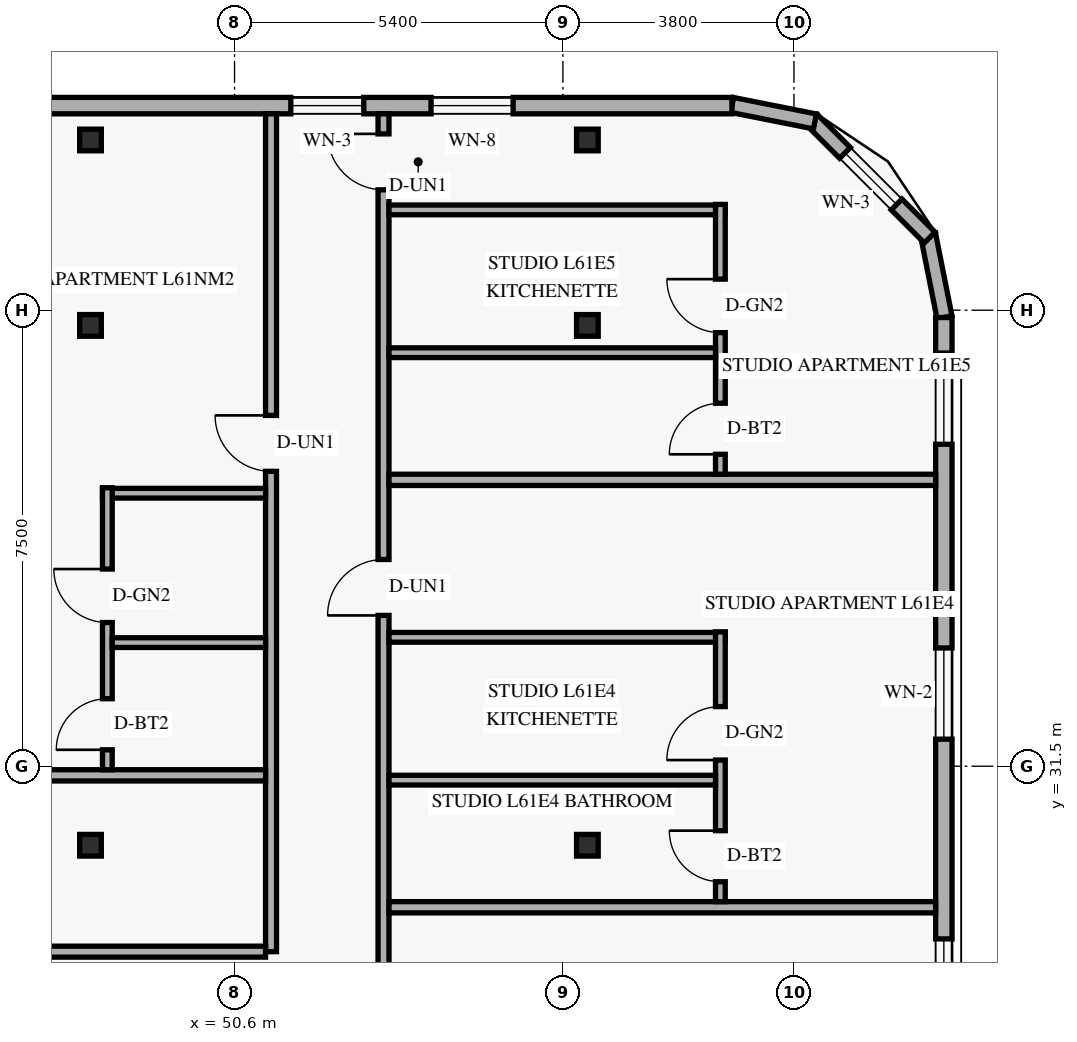
"""IFC4 building model, lengths in metres.
Left out: names, types, materials, properties, quantities, classifications, styles, units other than length and angle.
Written with IfcOpenShell. Run it as: python <this file> out.ifc"""

import sys

from ifc_helpers import new_model, si_unit, direction, frame, frame_2d, origin, origin_2d, place, context, subcontext, project, spatial, rectangle, hollow_rectangle, extrude, element, fill, save


model = new_model("IFC4")
c1 = context("Model", 3, precision=1e-05, world=origin(), true_north=direction((0.0, 1.0)))
c2 = subcontext(c1, "Body", "Model", "MODEL_VIEW")
j1 = project(units=[si_unit("LENGTHUNIT", "METRE"), si_unit("PLANEANGLEUNIT", "RADIAN")], contexts=[c1])
p1 = place(None, origin())
s1 = spatial("IfcSite", under=j1, at=p1, CompositionType="ELEMENT")
p2 = place(p1, origin())
s2 = spatial("IfcBuilding", under=s1, at=p2, CompositionType="ELEMENT")
p3 = place(p2, frame((0.0, 0.0, 235.2)))
s3 = spatial("IfcBuildingStorey", under=s2, at=p3, CompositionType="ELEMENT", Elevation=235.2)
for number, where, z_axis, x_axis in (
    (1, (48.168, 30.2, 0.0), (0.035, 0.0, 0.999), (0.0, 1.0, 0.0)),
    (2, (48.168, 38.75, 0.0), (0.035, 0.0, 0.999), (0.0, 1.0, 0.0)),
    (3, (48.168, 41.8, 0.0), (0.035, 0.0, 0.999), (0.0, 1.0, 0.0)),
):
    element("IfcColumn", number, at=place(p3, frame(where, z_axis=z_axis, x_axis=x_axis)), inside=s3, PredefinedType="COLUMN", context=c2, shape_type="SweptSolid", body=[
        extrude(hollow_rectangle(XDim=0.356, YDim=0.356, WallThickness=0.016, at=origin_2d()), origin(), (0.0, 0.0, 1.0), 3.602),
    ])
for number, where, z_axis, x_axis in (
    (4, (56.298, 30.2, 0.0), (0.058, 0.0, 0.998), (0.0, 1.0, 0.0)),
    (5, (56.298, 38.75, 0.0), (0.058, 0.0, 0.998), (0.0, 1.0, 0.0)),
    (6, (56.298, 41.8, 0.0), (0.058, 0.0, 0.998), (0.0, 1.0, 0.0)),
):
    element("IfcColumn", number, at=place(p3, frame(where, z_axis=z_axis, x_axis=x_axis)), inside=s3, PredefinedType="COLUMN", context=c2, shape_type="SweptSolid", body=[
        extrude(hollow_rectangle(XDim=0.356, YDim=0.356, WallThickness=0.016, at=origin_2d()), origin(), (0.0, 0.0, 1.0), 3.606),
    ])
p4 = place(p3, frame((62.276, 38.884, 0.0), z_axis=(0.0, 0.0, 1.0), x_axis=(-0.195135625965, 0.9807762678, 0.0)))
e7 = element("IfcWall", 7, at=p4, inside=s3, PredefinedType="SOLIDWALL", context=c2, shape_type="SweptSolid", body=[
    extrude(rectangle(XDim=1.389, YDim=0.25, at=frame_2d((0.694, 0.0))), origin(), (0.0, 0.0, 1.0), 3.36),
])
p5 = place(p3, frame((62.032, 40.195, 0.0), z_axis=(0.0, 0.0, 1.0), x_axis=(-0.707106781187, 0.707106781187, 0.0)))
e8 = element("IfcWall", 8, at=p5, inside=s3, PredefinedType="SOLIDWALL", context=c2, shape_type="SweptSolid", body=[
    extrude(rectangle(XDim=2.739, YDim=0.25, at=frame_2d((1.37, 0.0))), origin(), (0.0, 0.0, 1.0), 3.36),
])
p6 = place(p5, frame((0.77, 0.0, 0.85)))
e9 = element("IfcOpeningElement", 9, at=p6, cuts=e8, PredefinedType="OPENING", context=c2, shape_type="SweptSolid", body=[
    extrude(rectangle(XDim=1.2, YDim=1.5, at=frame_2d((0.6, 0.75))), frame((0.0, 0.135, 0.0), z_axis=(0.0, -1.0, 0.0), x_axis=(1.0, 0.0, 0.0)), (0.0, 0.0, 1.0), 0.27),
])
p7 = place(p3, frame((60.146, 42.105, 0.0), z_axis=(0.0, 0.0, 1.0), x_axis=(-0.980809899341, 0.19496651342, 0.0)))
e10 = element("IfcWall", 10, at=p7, inside=s3, PredefinedType="SOLIDWALL", context=c2, shape_type="SweptSolid", body=[
    extrude(rectangle(XDim=1.389, YDim=0.25, at=frame_2d((0.694, 0.0))), origin(), (0.0, 0.0, 1.0), 3.36),
])
p8 = place(p3, frame((62.265, 26.64, 0.0), z_axis=(0.0, 0.0, 1.0), x_axis=(0.0, 1.0, 0.0)))
e11 = element("IfcWall", 11, at=p8, inside=s3, PredefinedType="SOLIDWALL", context=c2, shape_type="SweptSolid", body=[
    extrude(rectangle(XDim=12.24, YDim=0.27, at=frame_2d((6.12, 0.0))), origin(), (0.0, 0.0, 1.0), 3.36),
])
p9 = place(p8, frame((0.52, 0.0, 0.85)))
e12 = element("IfcOpeningElement", 12, at=p9, cuts=e11, PredefinedType="OPENING", context=c2, shape_type="SweptSolid", body=[
    extrude(rectangle(XDim=1.5, YDim=1.55, at=frame_2d((0.75, 0.775))), frame((0.0, 0.145, 0.0), z_axis=(0.0, -1.0, 0.0), x_axis=(1.0, 0.0, 0.0)), (0.0, 0.0, 1.0), 0.29),
])
p10 = place(p8, frame((5.305, 0.0, 0.85)))
e13 = element("IfcOpeningElement", 13, at=p10, cuts=e11, PredefinedType="OPENING", context=c2, shape_type="SweptSolid", body=[
    extrude(rectangle(XDim=1.5, YDim=1.55, at=frame_2d((0.75, 0.775))), frame((0.0, 0.145, 0.0), z_axis=(0.0, -1.0, 0.0), x_axis=(1.0, 0.0, 0.0)), (0.0, 0.0, 1.0), 0.29),
])
p11 = place(p8, frame((10.155, 0.0, 0.85)))
e14 = element("IfcOpeningElement", 14, at=p11, cuts=e11, PredefinedType="OPENING", context=c2, shape_type="SweptSolid", body=[
    extrude(rectangle(XDim=1.5, YDim=1.55, at=frame_2d((0.75, 0.775))), frame((0.0, 0.145, 0.0), z_axis=(0.0, -1.0, 0.0), x_axis=(1.0, 0.0, 0.0)), (0.0, 0.0, 1.0), 0.29),
])
p12 = place(p3, frame((58.78, 42.365, 0.0), z_axis=(0.0, 0.0, 1.0), x_axis=(-1.0, 0.0, 0.0)))
e15 = element("IfcWall", 15, at=p12, inside=s3, PredefinedType="SOLIDWALL", context=c2, shape_type="SweptSolid", body=[
    extrude(rectangle(XDim=32.96, YDim=0.27, at=frame_2d((16.48, 0.0))), origin(), (0.0, 0.0, 1.0), 3.36),
])
p13 = place(p12, frame((17.96, 0.0, 0.85)))
e16 = element("IfcOpeningElement", 16, at=p13, cuts=e15, PredefinedType="OPENING", context=c2, shape_type="SweptSolid", body=[
    extrude(rectangle(XDim=1.35, YDim=1.55, at=frame_2d((0.675, 0.775))), frame((0.0, 0.145, 0.0), z_axis=(0.0, -1.0, 0.0), x_axis=(1.0, 0.0, 0.0)), (0.0, 0.0, 1.0), 0.29),
])
p14 = place(p12, frame((11.885, 0.0, 0.85)))
e17 = element("IfcOpeningElement", 17, at=p14, cuts=e15, PredefinedType="OPENING", context=c2, shape_type="SweptSolid", body=[
    extrude(rectangle(XDim=1.35, YDim=1.55, at=frame_2d((0.675, 0.775))), frame((0.0, 0.145, 0.0), z_axis=(0.0, -1.0, 0.0), x_axis=(1.0, 0.0, 0.0)), (0.0, 0.0, 1.0), 0.29),
])
p15 = place(p12, frame((6.055, 0.0, 0.85)))
e18 = element("IfcOpeningElement", 18, at=p15, cuts=e15, PredefinedType="OPENING", context=c2, shape_type="SweptSolid", body=[
    extrude(rectangle(XDim=1.2, YDim=1.5, at=frame_2d((0.6, 0.75))), frame((0.0, 0.145, 0.0), z_axis=(0.0, -1.0, 0.0), x_axis=(1.0, 0.0, 0.0)), (0.0, 0.0, 1.0), 0.29),
])
p16 = place(p12, frame((3.599, 0.0, 0.85)))
e19 = element("IfcOpeningElement", 19, at=p16, cuts=e15, PredefinedType="OPENING", context=c2, shape_type="SweptSolid", body=[
    extrude(rectangle(XDim=1.35, YDim=1.55, at=frame_2d((0.675, 0.775))), frame((0.0, 0.145, 0.0), z_axis=(0.0, -1.0, 0.0), x_axis=(1.0, 0.0, 0.0)), (0.0, 0.0, 1.0), 0.29),
])
p17 = place(p3, frame((51.2, 28.45, 0.0), z_axis=(0.0, 0.0, 1.0), x_axis=(0.0, 1.0, 0.0)))
e20 = element("IfcWall", 20, at=p17, inside=s3, PredefinedType="STANDARD", context=c2, shape_type="SweptSolid", body=[
    extrude(rectangle(XDim=13.78, YDim=0.18, at=frame_2d((6.89, 0.0))), origin(), (0.0, 0.0, 1.0), 2.803),
])
p18 = place(p17, frame((7.9, 0.0, 0.0)))
e21 = element("IfcOpeningElement", 21, at=p18, cuts=e20, PredefinedType="OPENING", context=c2, shape_type="SweptSolid", body=[
    extrude(rectangle(XDim=0.92, YDim=2.15, at=frame_2d((0.46, 1.075))), frame((0.0, 0.1, 0.0), z_axis=(0.0, -1.0, 0.0), x_axis=(1.0, 0.0, 0.0)), (0.0, 0.0, 1.0), 0.2),
])
p19 = place(p3, frame((37.64, 28.45, 0.0), z_axis=(0.0, 0.0, 1.0), x_axis=(1.0, 0.0, 0.0)))
e22 = element("IfcWall", 22, at=p19, inside=s3, PredefinedType="STANDARD", context=c2, shape_type="SweptSolid", body=[
    extrude(rectangle(XDim=13.47, YDim=0.18, at=frame_2d((6.735, 0.0))), origin(), (0.0, 0.0, 1.0), 2.803),
])
p20 = place(p3, frame((53.05, 5.77, 0.0), z_axis=(0.0, 0.0, 1.0), x_axis=(0.0, 1.0, 0.0)))
e23 = element("IfcWall", 23, at=p20, inside=s3, PredefinedType="STANDARD", context=c2, shape_type="SweptSolid", body=[
    extrude(rectangle(XDim=36.46, YDim=0.18, at=frame_2d((18.23, 0.0))), origin(), (0.0, 0.0, 1.0), 2.803),
])
p21 = place(p20, frame((1.357, 0.0, 0.0)))
e24 = element("IfcOpeningElement", 24, at=p21, cuts=e23, PredefinedType="OPENING", context=c2, shape_type="SweptSolid", body=[
    extrude(rectangle(XDim=0.92, YDim=2.15, at=frame_2d((0.46, 1.075))), frame((0.0, 0.1, 0.0), z_axis=(0.0, -1.0, 0.0), x_axis=(1.0, 0.0, 0.0)), (0.0, 0.0, 1.0), 0.2),
])
p22 = place(p20, frame((12.03, 0.0, 0.0)))
e25 = element("IfcOpeningElement", 25, at=p22, cuts=e23, PredefinedType="OPENING", context=c2, shape_type="SweptSolid", body=[
    extrude(rectangle(XDim=0.92, YDim=2.15, at=frame_2d((0.46, 1.075))), frame((0.0, 0.1, 0.0), z_axis=(0.0, -1.0, 0.0), x_axis=(1.0, 0.0, 0.0)), (0.0, 0.0, 1.0), 0.2),
])
p23 = place(p20, frame((20.27, 0.0, 0.0)))
e26 = element("IfcOpeningElement", 26, at=p23, cuts=e23, PredefinedType="OPENING", context=c2, shape_type="SweptSolid", body=[
    extrude(rectangle(XDim=0.92, YDim=2.15, at=frame_2d((0.46, 1.075))), frame((0.0, 0.1, 0.0), z_axis=(0.0, -1.0, 0.0), x_axis=(1.0, 0.0, 0.0)), (0.0, 0.0, 1.0), 0.2),
])
p24 = place(p20, frame((28.21, 0.0, 0.0)))
e27 = element("IfcOpeningElement", 27, at=p24, cuts=e23, PredefinedType="OPENING", context=c2, shape_type="SweptSolid", body=[
    extrude(rectangle(XDim=0.92, YDim=2.15, at=frame_2d((0.46, 1.075))), frame((0.0, 0.1, 0.0), z_axis=(0.0, -1.0, 0.0), x_axis=(1.0, 0.0, 0.0)), (0.0, 0.0, 1.0), 0.2),
])
p25 = place(p20, frame((35.21, 0.0, 0.0)))
e28 = element("IfcOpeningElement", 28, at=p25, cuts=e23, PredefinedType="OPENING", context=c2, shape_type="SweptSolid", body=[
    extrude(rectangle(XDim=0.92, YDim=2.15, at=frame_2d((0.46, 1.075))), frame((0.0, 0.1, 0.0), z_axis=(0.0, -1.0, 0.0), x_axis=(1.0, 0.0, 0.0)), (0.0, 0.0, 1.0), 0.2),
])
p26 = place(p3, frame((53.14, 29.18, 0.0), z_axis=(0.0, 0.0, 1.0), x_axis=(1.0, 0.0, 0.0)))
e29 = element("IfcWall", 29, at=p26, inside=s3, PredefinedType="PARTITIONING", context=c2, shape_type="SweptSolid", body=[
    extrude(rectangle(XDim=8.99, YDim=0.185, at=frame_2d((4.495, 0.0))), origin(), (0.0, 0.0, 1.0), 2.879),
])
p27 = place(p3, frame((53.14, 33.62, 0.0), z_axis=(0.0, 0.0, 1.0), x_axis=(1.0, 0.0, 0.0)))
e30 = element("IfcWall", 30, at=p27, inside=s3, PredefinedType="PLUMBINGWALL", context=c2, shape_type="SweptSolid", body=[
    extrude(rectangle(XDim=5.53, YDim=0.16, at=frame_2d((2.765, 0.0))), origin(), (0.0, 0.0, 1.0), 2.879),
])
p28 = place(p3, frame((58.59, 29.272, 0.0), z_axis=(0.0, 0.0, 1.0), x_axis=(0.0, 1.0, 0.0)))
e31 = element("IfcWall", 31, at=p28, inside=s3, PredefinedType="PLUMBINGWALL", context=c2, shape_type="SweptSolid", body=[
    extrude(rectangle(XDim=4.438, YDim=0.16, at=frame_2d((2.219, 0.0))), origin(), (0.0, 0.0, 1.0), 3.36),
])
p29 = place(p28, frame((0.327, 0.0, 0.0)))
e32 = element("IfcOpeningElement", 32, at=p29, cuts=e31, PredefinedType="OPENING", context=c2, shape_type="SweptSolid", body=[
    extrude(rectangle(XDim=0.84, YDim=2.12, at=frame_2d((0.42, 1.06))), frame((0.0, 0.09, 0.0), z_axis=(0.0, -1.0, 0.0), x_axis=(1.0, 0.0, 0.0)), (0.0, 0.0, 1.0), 0.18),
])
p30 = place(p28, frame((2.329, 0.0, 0.0)))
e33 = element("IfcOpeningElement", 33, at=p30, cuts=e31, PredefinedType="OPENING", context=c2, shape_type="SweptSolid", body=[
    extrude(rectangle(XDim=0.88, YDim=2.12, at=frame_2d((0.44, 1.06))), frame((0.0, 0.09, 0.0), z_axis=(0.0, -1.0, 0.0), x_axis=(1.0, 0.0, 0.0)), (0.0, 0.0, 1.0), 0.18),
])
p31 = place(p3, frame((53.14, 31.271, 0.0), z_axis=(0.0, 0.0, 1.0), x_axis=(1.0, 0.0, 0.0)))
e34 = element("IfcWall", 34, at=p31, inside=s3, PredefinedType="PLUMBINGWALL", context=c2, shape_type="SweptSolid", body=[
    extrude(rectangle(XDim=5.37, YDim=0.16, at=frame_2d((2.685, 0.0))), origin(), (0.0, 0.0, 1.0), 2.879),
])
p32 = place(p3, frame((53.14, 36.21, 0.0), z_axis=(0.0, 0.0, 1.0), x_axis=(1.0, 0.0, 0.0)))
e35 = element("IfcWall", 35, at=p32, inside=s3, PredefinedType="PARTITIONING", context=c2, shape_type="SweptSolid", body=[
    extrude(rectangle(XDim=8.99, YDim=0.185, at=frame_2d((4.495, 0.0))), origin(), (0.0, 0.0, 1.0), 2.879),
])
p33 = place(p3, frame((53.14, 40.65, 0.0), z_axis=(0.0, 0.0, 1.0), x_axis=(1.0, 0.0, 0.0)))
e36 = element("IfcWall", 36, at=p33, inside=s3, PredefinedType="PLUMBINGWALL", context=c2, shape_type="SweptSolid", body=[
    extrude(rectangle(XDim=5.53, YDim=0.16, at=frame_2d((2.765, 0.0))), origin(), (0.0, 0.0, 1.0), 2.879),
])
p34 = place(p3, frame((58.59, 36.302, 0.0), z_axis=(0.0, 0.0, 1.0), x_axis=(0.0, 1.0, 0.0)))
e37 = element("IfcWall", 37, at=p34, inside=s3, PredefinedType="PLUMBINGWALL", context=c2, shape_type="SweptSolid", body=[
    extrude(rectangle(XDim=4.438, YDim=0.16, at=frame_2d((2.219, 0.0))), origin(), (0.0, 0.0, 1.0), 3.36),
])
p35 = place(p34, frame((0.327, 0.0, 0.0)))
e38 = element("IfcOpeningElement", 38, at=p35, cuts=e37, PredefinedType="OPENING", context=c2, shape_type="SweptSolid", body=[
    extrude(rectangle(XDim=0.84, YDim=2.12, at=frame_2d((0.42, 1.06))), frame((0.0, 0.09, 0.0), z_axis=(0.0, -1.0, 0.0), x_axis=(1.0, 0.0, 0.0)), (0.0, 0.0, 1.0), 0.18),
])
p36 = place(p34, frame((2.329, 0.0, 0.0)))
e39 = element("IfcOpeningElement", 39, at=p36, cuts=e37, PredefinedType="OPENING", context=c2, shape_type="SweptSolid", body=[
    extrude(rectangle(XDim=0.88, YDim=2.12, at=frame_2d((0.44, 1.06))), frame((0.0, 0.09, 0.0), z_axis=(0.0, -1.0, 0.0), x_axis=(1.0, 0.0, 0.0)), (0.0, 0.0, 1.0), 0.18),
])
p37 = place(p3, frame((53.14, 38.301, 0.0), z_axis=(0.0, 0.0, 1.0), x_axis=(1.0, 0.0, 0.0)))
e40 = element("IfcWall", 40, at=p37, inside=s3, PredefinedType="PLUMBINGWALL", context=c2, shape_type="SweptSolid", body=[
    extrude(rectangle(XDim=5.37, YDim=0.16, at=frame_2d((2.685, 0.0))), origin(), (0.0, 0.0, 1.0), 2.879),
])
p38 = place(p3, frame((38.173, 31.35, 0.0), z_axis=(0.0, 0.0, 1.0), x_axis=(1.0, 0.0, 0.0)))
e41 = element("IfcWall", 41, at=p38, inside=s3, PredefinedType="PARTITIONING", context=c2, shape_type="SweptSolid", body=[
    extrude(rectangle(XDim=12.938, YDim=0.185, at=frame_2d((6.469, 0.0))), origin(), (0.0, 0.0, 1.0), 2.803),
])
p39 = place(p3, frame((48.428, 35.99, 0.0), z_axis=(0.0, 0.0, 1.0), x_axis=(1.0, 0.0, 0.0)))
e42 = element("IfcWall", 42, at=p39, inside=s3, PredefinedType="PLUMBINGWALL", context=c2, shape_type="SweptSolid", body=[
    extrude(rectangle(XDim=2.682, YDim=0.16, at=frame_2d((1.341, 0.0))), origin(), (0.0, 0.0, 1.0), 3.36),
])
p40 = place(p3, frame((48.508, 31.442, 0.0), z_axis=(0.0, 0.0, 1.0), x_axis=(0.0, 1.0, 0.0)))
e43 = element("IfcWall", 43, at=p40, inside=s3, PredefinedType="PLUMBINGWALL", context=c2, shape_type="SweptSolid", body=[
    extrude(rectangle(XDim=4.638, YDim=0.16, at=frame_2d((2.319, 0.0))), origin(), (0.0, 0.0, 1.0), 3.039),
])
p41 = place(p40, frame((0.327, 0.0, 0.0)))
e44 = element("IfcOpeningElement", 44, at=p41, cuts=e43, PredefinedType="OPENING", context=c2, shape_type="SweptSolid", body=[
    extrude(rectangle(XDim=0.84, YDim=2.12, at=frame_2d((0.42, 1.06))), frame((0.0, 0.09, 0.0), z_axis=(0.0, -1.0, 0.0), x_axis=(1.0, 0.0, 0.0)), (0.0, 0.0, 1.0), 0.18),
])
p42 = place(p40, frame((2.42, 0.0, 0.0)))
e45 = element("IfcOpeningElement", 45, at=p42, cuts=e43, PredefinedType="OPENING", context=c2, shape_type="SweptSolid", body=[
    extrude(rectangle(XDim=0.88, YDim=2.12, at=frame_2d((0.44, 1.06))), frame((0.0, 0.09, 0.0), z_axis=(0.0, -1.0, 0.0), x_axis=(1.0, 0.0, 0.0)), (0.0, 0.0, 1.0), 0.18),
])
p43 = place(p3, frame((48.588, 33.533, 0.0), z_axis=(0.0, 0.0, 1.0), x_axis=(1.0, 0.0, 0.0)))
e46 = element("IfcWall", 46, at=p43, inside=s3, PredefinedType="PLUMBINGWALL", context=c2, shape_type="SweptSolid", body=[
    extrude(rectangle(XDim=2.522, YDim=0.16, at=frame_2d((1.261, 0.0))), origin(), (0.0, 0.0, 1.0), 3.36),
])
p44 = place(p6, origin())
e47 = element("IfcWindow", 47, at=p44, inside=s3, PartitioningType="SINGLE_PANEL", PredefinedType="WINDOW", context=c2, shape_type="SweptSolid", body=[
    extrude(rectangle(XDim=1.2, YDim=1.5, at=frame_2d((0.6, 0.75))), frame((0.0, 0.03, 0.0), z_axis=(0.0, -1.0, 0.0), x_axis=(1.0, 0.0, 0.0)), (0.0, 0.0, 1.0), 0.06),
])
fill(e9, e47)
p45 = place(p9, origin())
e48 = element("IfcWindow", 48, at=p45, inside=s3, PartitioningType="SINGLE_PANEL", PredefinedType="WINDOW", context=c2, shape_type="SweptSolid", body=[
    extrude(rectangle(XDim=1.5, YDim=1.55, at=frame_2d((0.75, 0.775))), frame((0.0, 0.03, 0.0), z_axis=(0.0, -1.0, 0.0), x_axis=(1.0, 0.0, 0.0)), (0.0, 0.0, 1.0), 0.06),
])
fill(e12, e48)
p46 = place(p10, origin())
e49 = element("IfcWindow", 49, at=p46, inside=s3, PartitioningType="SINGLE_PANEL", PredefinedType="WINDOW", context=c2, shape_type="SweptSolid", body=[
    extrude(rectangle(XDim=1.5, YDim=1.55, at=frame_2d((0.75, 0.775))), frame((0.0, 0.03, 0.0), z_axis=(0.0, -1.0, 0.0), x_axis=(1.0, 0.0, 0.0)), (0.0, 0.0, 1.0), 0.06),
])
fill(e13, e49)
p47 = place(p11, origin())
e50 = element("IfcWindow", 50, at=p47, inside=s3, PartitioningType="SINGLE_PANEL", PredefinedType="WINDOW", context=c2, shape_type="SweptSolid", body=[
    extrude(rectangle(XDim=1.5, YDim=1.55, at=frame_2d((0.75, 0.775))), frame((0.0, 0.03, 0.0), z_axis=(0.0, -1.0, 0.0), x_axis=(1.0, 0.0, 0.0)), (0.0, 0.0, 1.0), 0.06),
])
fill(e14, e50)
p48 = place(p15, origin())
e51 = element("IfcWindow", 51, at=p48, inside=s3, PartitioningType="SINGLE_PANEL", PredefinedType="WINDOW", context=c2, shape_type="SweptSolid", body=[
    extrude(rectangle(XDim=1.2, YDim=1.5, at=frame_2d((0.6, 0.75))), frame((0.0, 0.03, 0.0), z_axis=(0.0, -1.0, 0.0), x_axis=(1.0, 0.0, 0.0)), (0.0, 0.0, 1.0), 0.06),
])
fill(e18, e51)
p49 = place(p16, origin())
e52 = element("IfcWindow", 52, at=p49, inside=s3, PartitioningType="SINGLE_PANEL", PredefinedType="WINDOW", context=c2, shape_type="SweptSolid", body=[
    extrude(rectangle(XDim=1.35, YDim=1.55, at=frame_2d((0.675, 0.775))), frame((0.0, 0.03, 0.0), z_axis=(0.0, -1.0, 0.0), x_axis=(1.0, 0.0, 0.0)), (0.0, 0.0, 1.0), 0.06),
])
fill(e19, e52)
p50 = place(p24, origin())
e53 = element("IfcDoor", 53, at=p50, inside=s3, OperationType="SINGLE_SWING_LEFT", PredefinedType="DOOR", context=c2, shape_type="SweptSolid", body=[
    extrude(rectangle(XDim=0.92, YDim=2.15, at=frame_2d((0.46, 1.075))), frame((0.0, 0.025, 0.0), z_axis=(0.0, -1.0, 0.0), x_axis=(1.0, 0.0, 0.0)), (0.0, 0.0, 1.0), 0.05),
])
fill(e27, e53)
p51 = place(p29, origin())
e54 = element("IfcDoor", 54, at=p51, inside=s3, OperationType="SINGLE_SWING_RIGHT", PredefinedType="DOOR", context=c2, shape_type="SweptSolid", body=[
    extrude(rectangle(XDim=0.84, YDim=2.12, at=frame_2d((0.42, 1.06))), frame((0.0, 0.025, 0.0), z_axis=(0.0, -1.0, 0.0), x_axis=(1.0, 0.0, 0.0)), (0.0, 0.0, 1.0), 0.05),
])
fill(e32, e54)
p52 = place(p30, origin())
e55 = element("IfcDoor", 55, at=p52, inside=s3, OperationType="SINGLE_SWING_LEFT", PredefinedType="DOOR", context=c2, shape_type="SweptSolid", body=[
    extrude(rectangle(XDim=0.88, YDim=2.12, at=frame_2d((0.44, 1.06))), frame((0.0, 0.025, 0.0), z_axis=(0.0, -1.0, 0.0), x_axis=(1.0, 0.0, 0.0)), (0.0, 0.0, 1.0), 0.05),
])
fill(e33, e55)
p53 = place(p25, origin())
e56 = element("IfcDoor", 56, at=p53, inside=s3, OperationType="SINGLE_SWING_RIGHT", PredefinedType="DOOR", context=c2, shape_type="SweptSolid", body=[
    extrude(rectangle(XDim=0.92, YDim=2.15, at=frame_2d((0.46, 1.075))), frame((0.0, 0.025, 0.0), z_axis=(0.0, -1.0, 0.0), x_axis=(1.0, 0.0, 0.0)), (0.0, 0.0, 1.0), 0.05),
])
fill(e28, e56)
p54 = place(p35, origin())
e57 = element("IfcDoor", 57, at=p54, inside=s3, OperationType="SINGLE_SWING_LEFT", PredefinedType="DOOR", context=c2, shape_type="SweptSolid", body=[
    extrude(rectangle(XDim=0.84, YDim=2.12, at=frame_2d((0.42, 1.06))), frame((0.0, 0.025, 0.0), z_axis=(0.0, -1.0, 0.0), x_axis=(1.0, 0.0, 0.0)), (0.0, 0.0, 1.0), 0.05),
])
fill(e38, e57)
p55 = place(p36, origin())
e58 = element("IfcDoor", 58, at=p55, inside=s3, OperationType="SINGLE_SWING_RIGHT", PredefinedType="DOOR", context=c2, shape_type="SweptSolid", body=[
    extrude(rectangle(XDim=0.88, YDim=2.12, at=frame_2d((0.44, 1.06))), frame((0.0, 0.025, 0.0), z_axis=(0.0, -1.0, 0.0), x_axis=(1.0, 0.0, 0.0)), (0.0, 0.0, 1.0), 0.05),
])
fill(e39, e58)
p56 = place(p18, origin())
e59 = element("IfcDoor", 59, at=p56, inside=s3, OperationType="SINGLE_SWING_RIGHT", PredefinedType="DOOR", context=c2, shape_type="SweptSolid", body=[
    extrude(rectangle(XDim=0.92, YDim=2.15, at=frame_2d((0.46, 1.075))), frame((0.0, 0.025, 0.0), z_axis=(0.0, -1.0, 0.0), x_axis=(1.0, 0.0, 0.0)), (0.0, 0.0, 1.0), 0.05),
])
fill(e21, e59)
p57 = place(p41, origin())
e60 = element("IfcDoor", 60, at=p57, inside=s3, OperationType="SINGLE_SWING_LEFT", PredefinedType="DOOR", context=c2, shape_type="SweptSolid", body=[
    extrude(rectangle(XDim=0.84, YDim=2.12, at=frame_2d((0.42, 1.06))), frame((0.0, 0.025, 0.0), z_axis=(0.0, -1.0, 0.0), x_axis=(1.0, 0.0, 0.0)), (0.0, 0.0, 1.0), 0.05),
])
fill(e44, e60)
p58 = place(p42, origin())
e61 = element("IfcDoor", 61, at=p58, inside=s3, OperationType="SINGLE_SWING_RIGHT", PredefinedType="DOOR", context=c2, shape_type="SweptSolid", body=[
    extrude(rectangle(XDim=0.88, YDim=2.12, at=frame_2d((0.44, 1.06))), frame((0.0, 0.025, 0.0), z_axis=(0.0, -1.0, 0.0), x_axis=(1.0, 0.0, 0.0)), (0.0, 0.0, 1.0), 0.05),
])
fill(e45, e61)
save(model, sys.argv[1])
